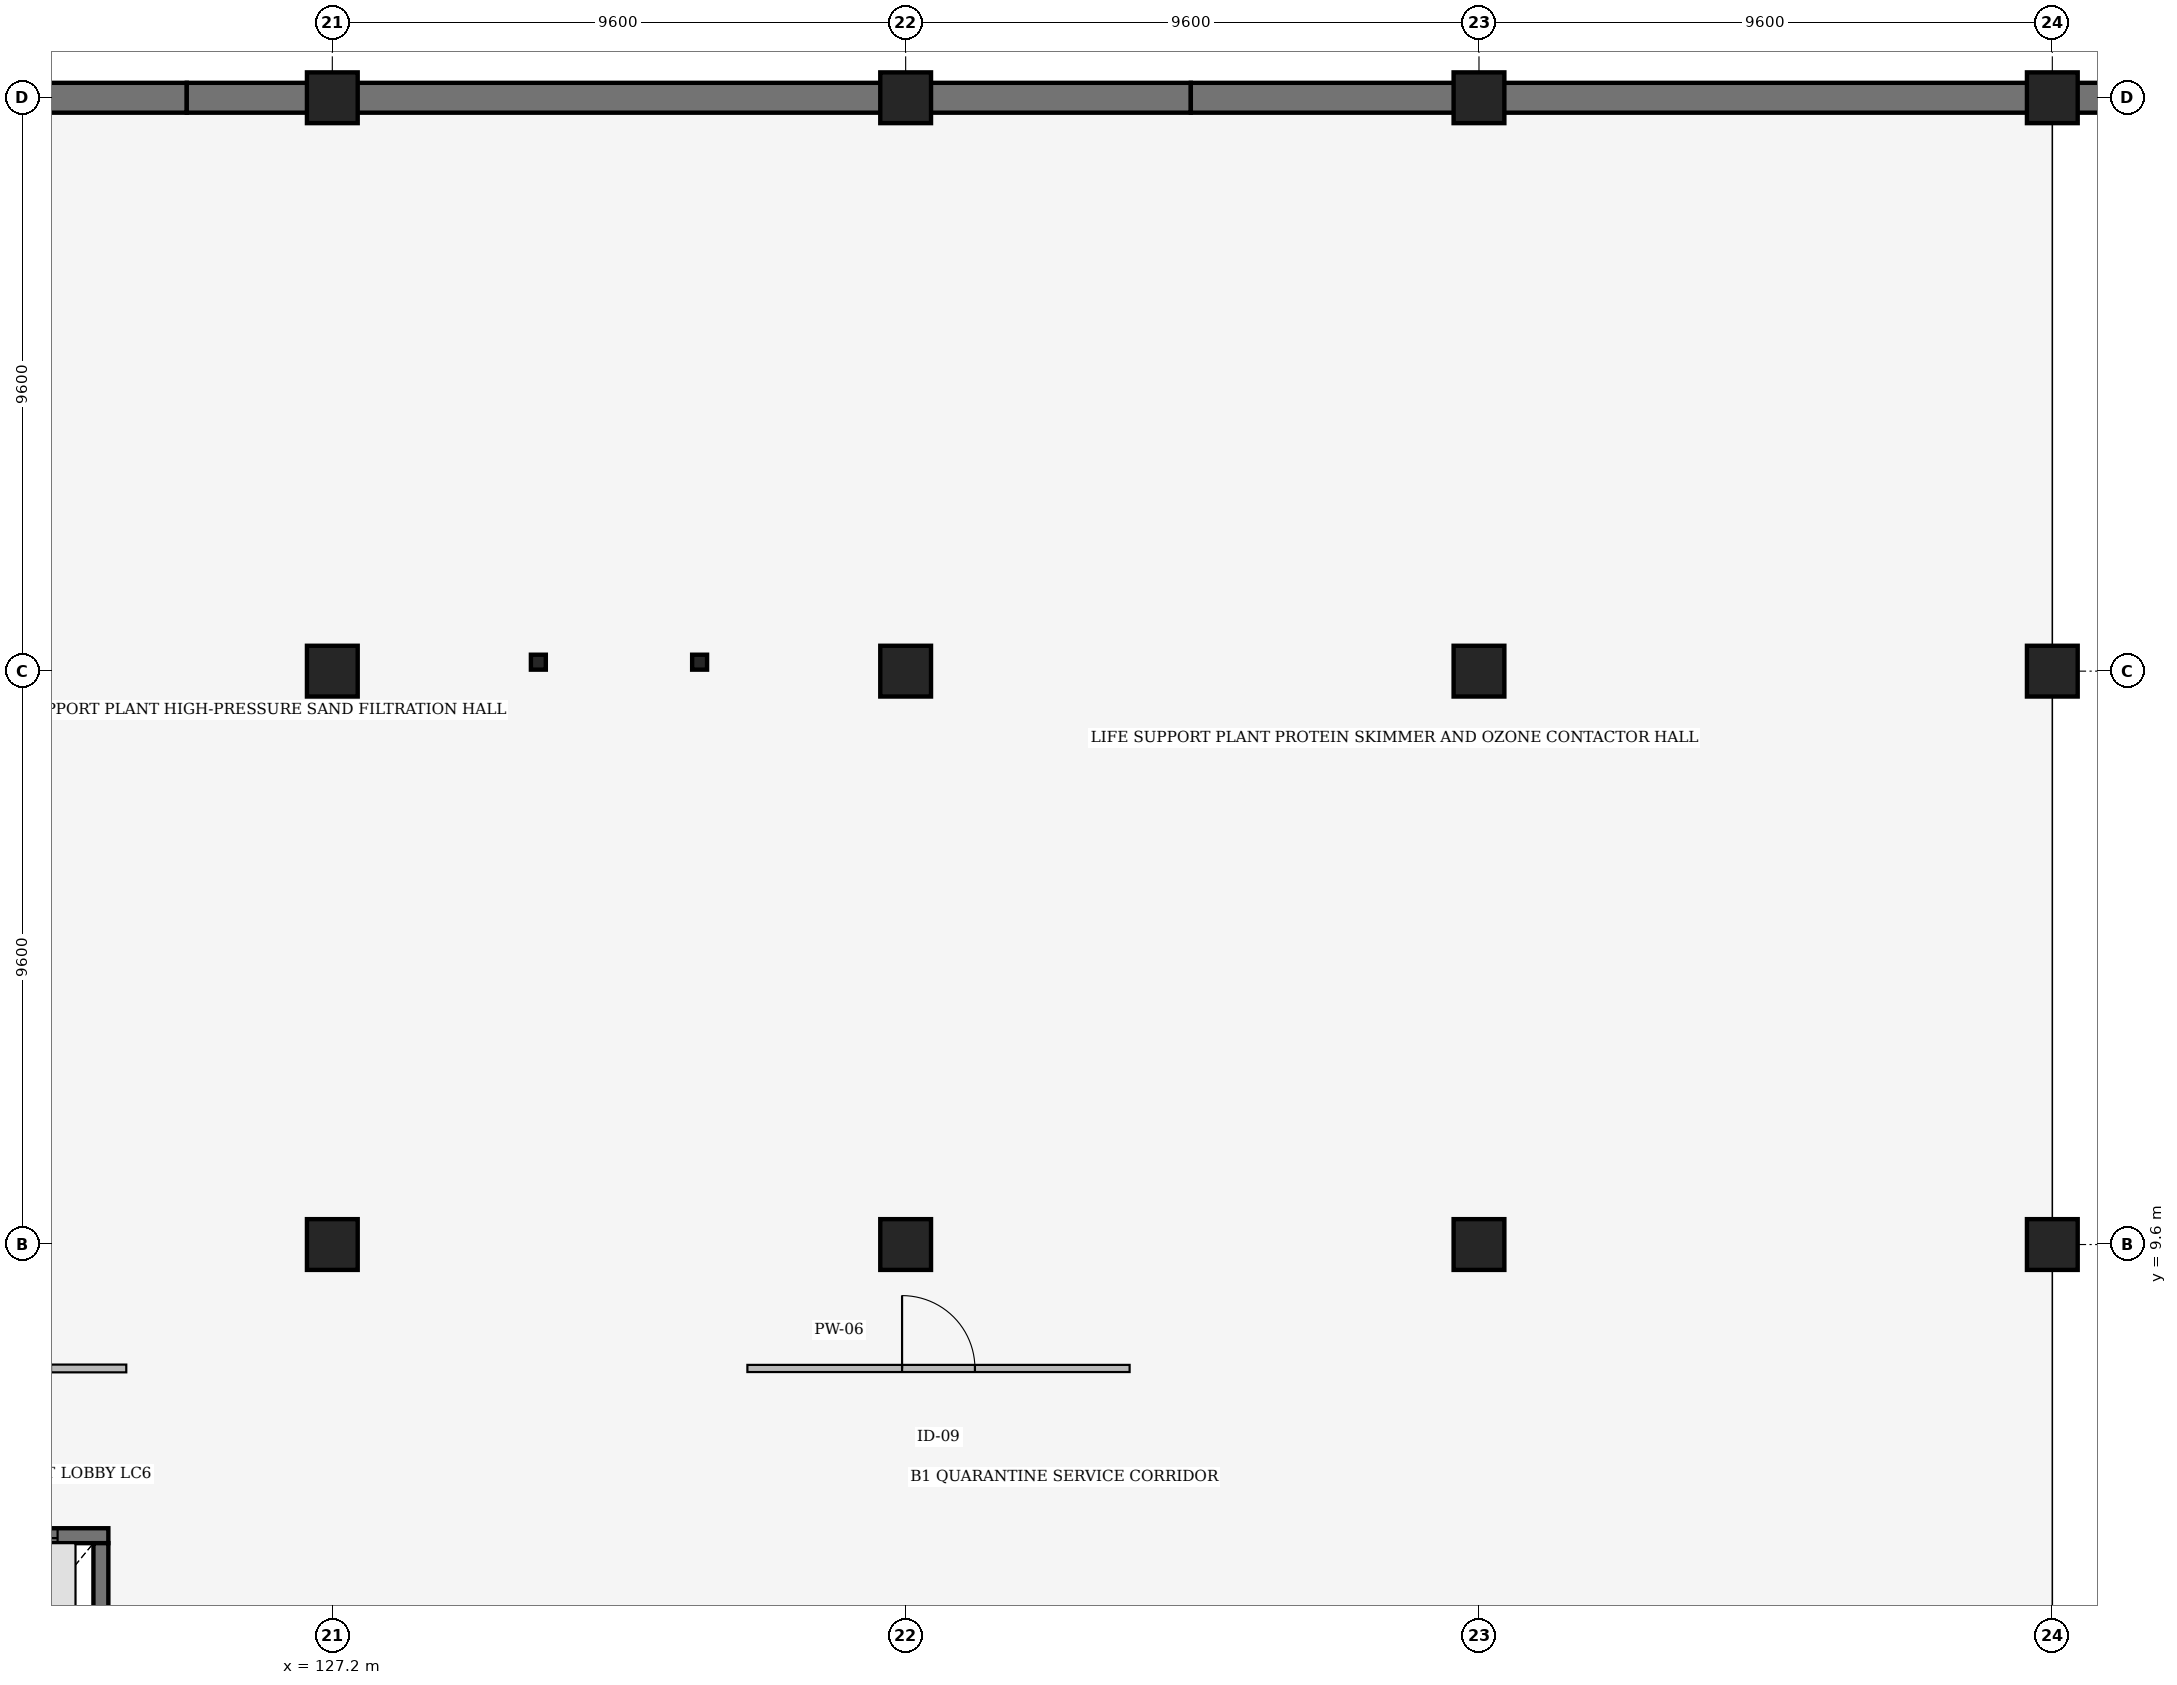
"""IFC4 building model, lengths in metres.
Left out: names, types, materials, properties, quantities, classifications, styles, units other than length and angle.
Written with IfcOpenShell. Run it as: python <this file> out.ifc"""

import sys

from ifc_helpers import new_model, si_unit, direction, frame, frame_2d, origin, origin_2d, place, context, subcontext, project, spatial, rectangle, hollow_rectangle, extrude, element, fill, save


model = new_model("IFC4")
c1 = context("Model", 3, precision=1e-05, world=origin(), true_north=direction((0.0, 1.0)))
c2 = subcontext(c1, "Body", "Model", "MODEL_VIEW")
j1 = project(units=[si_unit("LENGTHUNIT", "METRE"), si_unit("PLANEANGLEUNIT", "RADIAN")], contexts=[c1])
p1 = place(None, origin())
s1 = spatial("IfcSite", under=j1, at=p1, CompositionType="ELEMENT")
p2 = place(p1, origin())
s2 = spatial("IfcBuilding", under=s1, at=p2, CompositionType="ELEMENT")
p3 = place(p2, frame((0.0, 0.0, -4.8)))
s3 = spatial("IfcBuildingStorey", under=s2, at=p3, CompositionType="ELEMENT", Elevation=-4.8)
for number, where, z_axis, x_axis in (
    (1, (127.2, 9.6, 0.0), (0.0, 0.0, 1.0), (1.0, 0.0, 0.0)),
    (2, (127.2, 19.2, 0.0), (0.0, 0.0, 1.0), (1.0, 0.0, 0.0)),
    (3, (127.2, 28.8, 0.0), (0.0, 0.0, 1.0), (1.0, 0.0, 0.0)),
    (4, (136.8, 9.6, 0.0), (0.0, 0.0, 1.0), (1.0, 0.0, 0.0)),
    (5, (136.8, 19.2, 0.0), (0.0, 0.0, 1.0), (1.0, 0.0, 0.0)),
    (6, (136.8, 28.8, 0.0), (0.0, 0.0, 1.0), (1.0, 0.0, 0.0)),
    (7, (146.4, 9.6, 0.0), (0.0, 0.0, 1.0), (1.0, 0.0, 0.0)),
    (8, (146.4, 19.2, 0.0), (0.0, 0.0, 1.0), (1.0, 0.0, 0.0)),
    (9, (146.4, 28.8, 0.0), (0.0, 0.0, 1.0), (1.0, 0.0, 0.0)),
    (10, (156.0, 9.6, 0.0), (0.0, 0.0, 1.0), (1.0, 0.0, 0.0)),
    (11, (156.0, 19.2, 0.0), (0.0, 0.0, 1.0), (1.0, 0.0, 0.0)),
    (12, (156.0, 28.8, 0.0), (0.0, 0.0, 1.0), (1.0, 0.0, 0.0)),
):
    element("IfcColumn", number, at=place(p3, frame(where, z_axis=z_axis, x_axis=x_axis)), inside=s3, PredefinedType="COLUMN", context=c2, shape_type="SweptSolid", body=[
        extrude(rectangle(XDim=0.85, YDim=0.85, at=origin_2d()), origin(), (0.0, 0.0, 1.0), 4.8),
    ])
for number, where, z_axis, x_axis in (
    (13, (130.65, 19.35, 0.0), (0.0, 0.0, 1.0), (1.0, 0.0, 0.0)),
    (14, (133.35, 19.35, 0.0), (0.0, 0.0, 1.0), (1.0, 0.0, 0.0)),
):
    element("IfcColumn", number, at=place(p3, frame(where, z_axis=z_axis, x_axis=x_axis)), inside=s3, PredefinedType="COLUMN", context=c2, shape_type="SweptSolid", body=[
        extrude(hollow_rectangle(XDim=0.25, YDim=0.25, WallThickness=0.012, InnerFilletRadius=0.012, OuterFilletRadius=0.025, at=origin_2d()), origin(), (0.0, 0.0, 1.0), 4.8),
    ])
p4 = place(p3, frame((108.23, 28.8, 0.0), z_axis=(0.0, 0.0, 1.0), x_axis=(1.0, 0.0, 0.0)))
e15 = element("IfcWall", 15, at=p4, inside=s3, PredefinedType="USERDEFINED", context=c2, shape_type="SweptSolid", body=[
    extrude(rectangle(XDim=16.533, YDim=0.5, at=frame_2d((8.267, 0.0))), origin(), (0.0, 0.0, 1.0), 4.5),
])
for number, where, z_axis, x_axis in (
    (16, (124.763, 28.8, 0.0), (0.0, 0.0, 1.0), (1.0, 0.0, 0.0)),
    (17, (141.575, 28.8, 0.0), (0.0, 0.0, 1.0), (1.0, 0.0, 0.0)),
):
    element("IfcWall", number, at=place(p3, frame(where, z_axis=z_axis, x_axis=x_axis)), inside=s3, PredefinedType="USERDEFINED", context=c2, shape_type="SweptSolid", body=[
        extrude(rectangle(XDim=16.812, YDim=0.5, at=frame_2d((8.406, 0.0))), origin(), (0.0, 0.0, 1.0), 4.5),
    ])
p5 = place(p3, frame((120.15, 4.725, 0.0), z_axis=(0.0, 0.0, 1.0), x_axis=(1.0, 0.0, 0.0)))
e18 = element("IfcWall", 18, at=p5, inside=s3, PredefinedType="SHEAR", context=c2, shape_type="SweptSolid", body=[
    extrude(rectangle(XDim=3.3, YDim=0.25, at=frame_2d((1.65, 0.0))), origin(), (0.0, 0.0, 1.0), 4.45),
])
p6 = place(p5, frame((0.85, 0.0, 0.0)))
e19 = element("IfcOpeningElement", 19, at=p6, cuts=e18, PredefinedType="OPENING", context=c2, shape_type="SweptSolid", body=[
    extrude(rectangle(XDim=1.6, YDim=2.3, at=frame_2d((0.8, 1.15))), frame((0.0, 0.135, 0.0), z_axis=(0.0, -1.0, 0.0), x_axis=(1.0, 0.0, 0.0)), (0.0, 0.0, 1.0), 0.27),
])
p7 = place(p3, frame((123.325, 1.2, 0.0), z_axis=(0.0, 0.0, 1.0), x_axis=(0.0, 1.0, 0.0)))
e20 = element("IfcWall", 20, at=p7, inside=s3, PredefinedType="SHEAR", context=c2, shape_type="SweptSolid", body=[
    extrude(rectangle(XDim=3.4, YDim=0.25, at=frame_2d((1.7, 0.0))), origin(), (0.0, 0.0, 1.0), 4.45),
])
p8 = place(p3, frame((120.05, 7.525, 0.0), z_axis=(0.0, 0.0, 1.0), x_axis=(1.0, 0.0, 0.0)))
e21 = element("IfcWall", 21, at=p8, inside=s3, PredefinedType="PARTITIONING", context=c2, shape_type="SweptSolid", body=[
    extrude(rectangle(XDim=3.7, YDim=0.13, at=frame_2d((1.85, 0.0))), origin(), (0.0, 0.0, 1.0), 4.164),
])
p9 = place(p8, frame((1.26, 0.0, 0.0)))
e22 = element("IfcOpeningElement", 22, at=p9, cuts=e21, PredefinedType="OPENING", context=c2, shape_type="SweptSolid", body=[
    extrude(rectangle(XDim=1.18, YDim=2.22, at=frame_2d((0.59, 1.11))), frame((0.0, 0.075, 0.0), z_axis=(0.0, -1.0, 0.0), x_axis=(1.0, 0.0, 0.0)), (0.0, 0.0, 1.0), 0.15),
])
p10 = place(p3, frame((134.15, 7.525, 0.0), z_axis=(0.0, 0.0, 1.0), x_axis=(1.0, 0.0, 0.0)))
e23 = element("IfcWall", 23, at=p10, inside=s3, PredefinedType="PARTITIONING", context=c2, shape_type="SweptSolid", body=[
    extrude(rectangle(XDim=6.4, YDim=0.12, at=frame_2d((3.2, 0.0))), origin(), (0.0, 0.0, 1.0), 3.216),
])
p11 = place(p10, frame((2.59, 0.0, 0.0)))
e24 = element("IfcOpeningElement", 24, at=p11, cuts=e23, PredefinedType="OPENING", context=c2, shape_type="SweptSolid", body=[
    extrude(rectangle(XDim=1.22, YDim=2.25, at=frame_2d((0.61, 1.125))), frame((0.0, 0.07, 0.0), z_axis=(0.0, -1.0, 0.0), x_axis=(1.0, 0.0, 0.0)), (0.0, 0.0, 1.0), 0.14),
])
p12 = place(p6, origin())
e25 = element("IfcDoor", 25, at=p12, inside=s3, OperationType="DOUBLE_DOOR_SLIDING", PredefinedType="DOOR", context=c2, shape_type="SweptSolid", body=[
    extrude(rectangle(XDim=1.6, YDim=2.3, at=frame_2d((0.8, 1.15))), frame((0.0, 0.025, 0.0), z_axis=(0.0, -1.0, 0.0), x_axis=(1.0, 0.0, 0.0)), (0.0, 0.0, 1.0), 0.05),
])
fill(e19, e25)
p13 = place(p11, origin())
e26 = element("IfcDoor", 26, at=p13, inside=s3, OperationType="SINGLE_SWING_LEFT", PredefinedType="DOOR", context=c2, shape_type="SweptSolid", body=[
    extrude(rectangle(XDim=1.22, YDim=2.25, at=frame_2d((0.61, 1.125))), frame((0.0, 0.025, 0.0), z_axis=(0.0, -1.0, 0.0), x_axis=(1.0, 0.0, 0.0)), (0.0, 0.0, 1.0), 0.05),
])
fill(e24, e26)
save(model, sys.argv[1])
